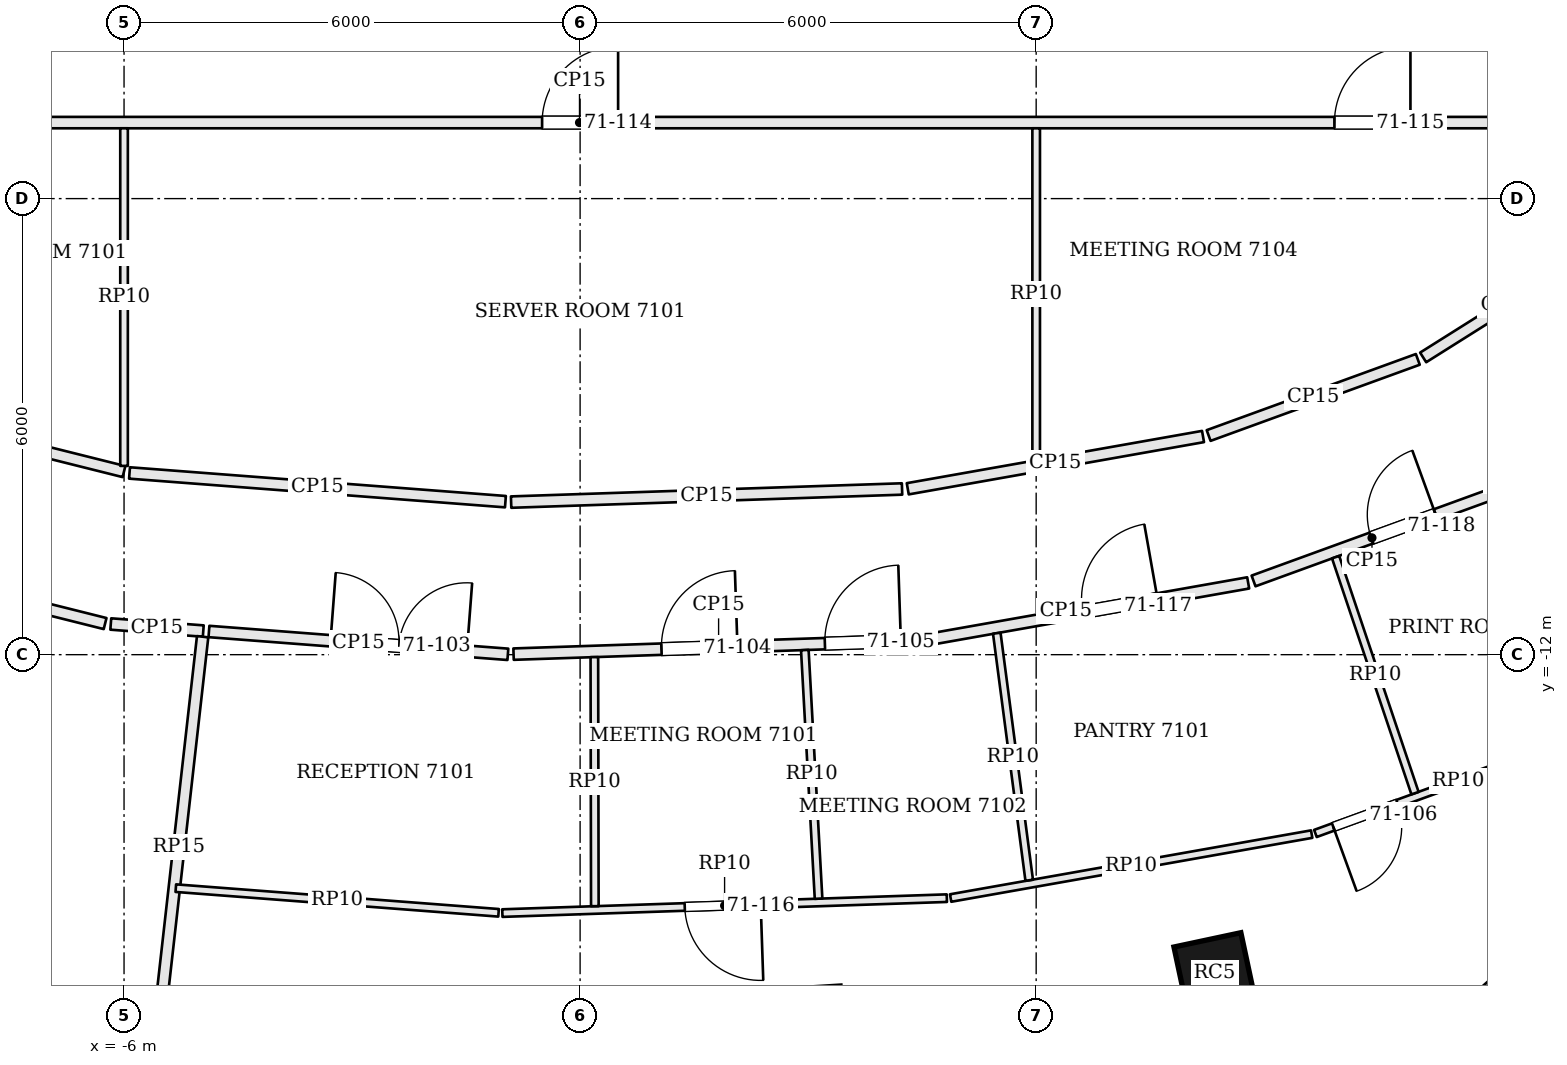
"""IFC4 building model, lengths in metres.
Left out: names, types, materials, properties, quantities, classifications, styles, units other than length and angle.
Written with IfcOpenShell. Run it as: python <this file> out.ifc"""

import sys

from ifc_helpers import new_model, si_unit, direction, frame, frame_2d, origin, origin_2d, place, context, subcontext, project, spatial, rectangle, extrude, element, fill, save


model = new_model("IFC4")
c1 = context("Model", 3, precision=1e-05, world=origin(), true_north=direction((0.0, 1.0)))
c2 = subcontext(c1, "Body", "Model", "MODEL_VIEW")
j1 = project(units=[si_unit("LENGTHUNIT", "METRE"), si_unit("PLANEANGLEUNIT", "RADIAN")], contexts=[c1])
p1 = place(None, origin())
s1 = spatial("IfcSite", under=j1, at=p1, CompositionType="ELEMENT")
p2 = place(p1, origin())
s2 = spatial("IfcBuilding", under=s1, at=p2, CompositionType="ELEMENT")
p3 = place(p2, frame((0.0, 0.0, 288.3)))
s3 = spatial("IfcBuildingStorey", under=s2, at=p3, CompositionType="ELEMENT", Elevation=288.3)
p4 = place(p3, frame((8.347, -16.192, 0.0), z_axis=(0.0, 0.0, 1.0), x_axis=(0.977944102772, 0.208866780156, 0.0)))
e1 = element("IfcColumn", 1, at=p4, inside=s3, PredefinedType="COLUMN", context=c2, shape_type="SweptSolid", body=[
    extrude(rectangle(XDim=0.9, YDim=0.9, at=origin_2d()), origin(), (0.0, 0.0, 1.0), 3.9),
])
p5 = place(p3, frame((9.21, -19.03, 0.0), z_axis=(0.0, 0.0, 1.0), x_axis=(0.747396648191, 0.664378092861, 0.0)))
e2 = element("IfcWall", 2, at=p5, inside=s3, PredefinedType="SOLIDWALL", context=c2, shape_type="SweptSolid", body=[
    extrude(rectangle(XDim=4.252, YDim=0.45, at=frame_2d((2.126, 0.0))), origin(), (0.0, 0.0, 1.0), 3.7),
])
p6 = place(p5, frame((1.076, 0.0, 0.9)))
e3 = element("IfcOpeningElement", 3, at=p6, cuts=e2, PredefinedType="OPENING", context=c2, shape_type="SweptSolid", body=[
    extrude(rectangle(XDim=2.1, YDim=2.3, at=frame_2d((1.05, 1.15))), frame((0.0, 0.235, 0.0), z_axis=(0.0, -1.0, 0.0), x_axis=(1.0, 0.0, 0.0)), (0.0, 0.0, 1.0), 0.47),
])
p7 = place(p3, frame((-10.333, -10.569, 0.0), z_axis=(0.0, 0.0, 1.0), x_axis=(0.970067398009, -0.242835836151, 0.0)))
e4 = element("IfcWall", 4, at=p7, inside=s3, PredefinedType="PARTITIONING", context=c2, shape_type="SweptSolid", body=[
    extrude(rectangle(XDim=4.209, YDim=0.15, at=frame_2d((2.105, 0.0))), origin(), (0.0, 0.0, 1.0), 3.198),
])
p8 = place(p3, frame((-6.175, -11.596, 0.0), z_axis=(0.0, 0.0, 1.0), x_axis=(0.997106038867, -0.076023333621, 0.0)))
e5 = element("IfcWall", 5, at=p8, inside=s3, PredefinedType="PARTITIONING", context=c2, shape_type="SweptSolid", body=[
    extrude(rectangle(XDim=1.22, YDim=0.15, at=frame_2d((0.61, 0.0))), origin(), (0.0, 0.0, 1.0), 3.198),
])
p9 = place(p3, frame((-5.59, -17.294, 0.0), z_axis=(0.0, 0.0, 1.0), x_axis=(0.112044411854, 0.993703200041, 0.0)))
e6 = element("IfcWall", 6, at=p9, inside=s3, PredefinedType="PARTITIONING", context=c2, shape_type="SweptSolid", body=[
    extrude(rectangle(XDim=5.565, YDim=0.15, at=frame_2d((2.783, 0.0))), origin(), (0.0, 0.0, 1.0), 3.234),
])
p10 = place(p3, frame((-4.883, -11.695, 0.0), z_axis=(0.0, 0.0, 1.0), x_axis=(0.997096936577, -0.076142623207, 0.0)))
e7 = element("IfcWall", 7, at=p10, inside=s3, PredefinedType="PARTITIONING", context=c2, shape_type="SweptSolid", body=[
    extrude(rectangle(XDim=3.944, YDim=0.15, at=frame_2d((1.972, 0.0))), origin(), (0.0, 0.0, 1.0), 3.198),
])
p11 = place(p10, frame((1.604, 0.0, 0.0)))
e8 = element("IfcOpeningElement", 8, at=p11, cuts=e7, PredefinedType="OPENING", context=c2, shape_type="SweptSolid", body=[
    extrude(rectangle(XDim=1.8, YDim=2.1, at=frame_2d((0.9, 1.05))), frame((0.0, 0.085, 0.0), z_axis=(0.0, -1.0, 0.0), x_axis=(1.0, 0.0, 0.0)), (0.0, 0.0, 1.0), 0.17),
])
p12 = place(p3, frame((-0.875, -11.993, 0.0), z_axis=(0.0, 0.0, 1.0), x_axis=(0.999436745295, 0.033558786542, 0.0)))
e9 = element("IfcWall", 9, at=p12, inside=s3, PredefinedType="PARTITIONING", context=c2, shape_type="SweptSolid", body=[
    extrude(rectangle(XDim=5.398, YDim=0.15, at=frame_2d((2.699, 0.0))), origin(), (0.0, 0.0, 1.0), 3.198),
])
p13 = place(p12, frame((1.947, 0.0, 0.0)))
e10 = element("IfcOpeningElement", 10, at=p13, cuts=e9, PredefinedType="OPENING", context=c2, shape_type="SweptSolid", body=[
    extrude(rectangle(XDim=1.0, YDim=2.4, at=frame_2d((0.5, 1.2))), frame((0.0, 0.085, 0.0), z_axis=(0.0, -1.0, 0.0), x_axis=(1.0, 0.0, 0.0)), (0.0, 0.0, 1.0), 0.17),
])
p14 = place(p12, frame((4.098, 0.0, 0.0)))
e11 = element("IfcOpeningElement", 11, at=p14, cuts=e9, PredefinedType="OPENING", context=c2, shape_type="SweptSolid", body=[
    extrude(rectangle(XDim=1.0, YDim=2.4, at=frame_2d((0.5, 1.2))), frame((0.0, 0.085, 0.0), z_axis=(0.0, -1.0, 0.0), x_axis=(1.0, 0.0, 0.0)), (0.0, 0.0, 1.0), 0.17),
])
p15 = place(p3, frame((4.594, -11.799, 0.0), z_axis=(0.0, 0.0, 1.0), x_axis=(0.984693444773, 0.174295208833, 0.0)))
e12 = element("IfcWall", 12, at=p15, inside=s3, PredefinedType="PARTITIONING", context=c2, shape_type="SweptSolid", body=[
    extrude(rectangle(XDim=4.261, YDim=0.15, at=frame_2d((2.13, 0.0))), origin(), (0.0, 0.0, 1.0), 3.198),
])
p16 = place(p15, frame((2.05, 0.0, 0.0)))
e13 = element("IfcOpeningElement", 13, at=p16, cuts=e12, PredefinedType="OPENING", context=c2, shape_type="SweptSolid", body=[
    extrude(rectangle(XDim=1.0, YDim=2.1, at=frame_2d((0.5, 1.05))), frame((0.0, 0.085, 0.0), z_axis=(0.0, -1.0, 0.0), x_axis=(1.0, 0.0, 0.0)), (0.0, 0.0, 1.0), 0.17),
])
p17 = place(p3, frame((8.86, -11.03, 0.0), z_axis=(0.0, 0.0, 1.0), x_axis=(0.939685902536, 0.342038601001, 0.0)))
e14 = element("IfcWall", 14, at=p17, inside=s3, PredefinedType="PARTITIONING", context=c2, shape_type="SweptSolid", body=[
    extrude(rectangle(XDim=3.316, YDim=0.15, at=frame_2d((1.658, 0.0))), origin(), (0.0, 0.0, 1.0), 3.198),
])
p18 = place(p17, frame((1.65, 0.0, 0.0)))
e15 = element("IfcOpeningElement", 15, at=p18, cuts=e14, PredefinedType="OPENING", context=c2, shape_type="SweptSolid", body=[
    extrude(rectangle(XDim=0.9, YDim=2.1, at=frame_2d((0.45, 1.05))), frame((0.0, 0.085, 0.0), z_axis=(0.0, -1.0, 0.0), x_axis=(1.0, 0.0, 0.0)), (0.0, 0.0, 1.0), 0.17),
])
p19 = place(p3, frame((13.293, -6.704, 0.0), z_axis=(0.0, 0.0, 1.0), x_axis=(-0.84641299998, -0.532527026041, 0.0)))
e16 = element("IfcWall", 16, at=p19, inside=s3, PredefinedType="PARTITIONING", context=c2, shape_type="SweptSolid", body=[
    extrude(rectangle(XDim=2.602, YDim=0.15, at=frame_2d((1.301, 0.0))), origin(), (0.0, 0.0, 1.0), 3.198),
])
p20 = place(p3, frame((11.021, -8.115, 0.0), z_axis=(0.0, 0.0, 1.0), x_axis=(-0.939683845313, -0.342044252778, 0.0)))
e17 = element("IfcWall", 17, at=p20, inside=s3, PredefinedType="PARTITIONING", context=c2, shape_type="SweptSolid", body=[
    extrude(rectangle(XDim=2.929, YDim=0.15, at=frame_2d((1.464, 0.0))), origin(), (0.0, 0.0, 1.0), 3.198),
])
p21 = place(p3, frame((8.195, -9.13, 0.0), z_axis=(0.0, 0.0, 1.0), x_axis=(-0.9846880937, -0.174325437403, 0.0)))
e18 = element("IfcWall", 18, at=p21, inside=s3, PredefinedType="PARTITIONING", context=c2, shape_type="SweptSolid", body=[
    extrude(rectangle(XDim=3.945, YDim=0.15, at=frame_2d((1.973, 0.0))), origin(), (0.0, 0.0, 1.0), 3.198),
])
p22 = place(p3, frame((4.236, -9.82, 0.0), z_axis=(0.0, 0.0, 1.0), x_axis=(-0.999435760561, -0.033588100749, 0.0)))
e19 = element("IfcWall", 19, at=p22, inside=s3, PredefinedType="PARTITIONING", context=c2, shape_type="SweptSolid", body=[
    extrude(rectangle(XDim=5.146, YDim=0.15, at=frame_2d((2.573, 0.0))), origin(), (0.0, 0.0, 1.0), 3.198),
])
p23 = place(p3, frame((-0.982, -9.987, 0.0), z_axis=(0.0, 0.0, 1.0), x_axis=(-0.997096607341, 0.07614693447, 0.0)))
e20 = element("IfcWall", 20, at=p23, inside=s3, PredefinedType="PARTITIONING", context=c2, shape_type="SweptSolid", body=[
    extrude(rectangle(XDim=4.96, YDim=0.15, at=frame_2d((2.48, 0.0))), origin(), (0.0, 0.0, 1.0), 3.198),
])
p24 = place(p3, frame((-6.001, -9.591, 0.0), z_axis=(0.0, 0.0, 1.0), x_axis=(-0.970063855769, 0.242849986061, 0.0)))
e21 = element("IfcWall", 21, at=p24, inside=s3, PredefinedType="PARTITIONING", context=c2, shape_type="SweptSolid", body=[
    extrude(rectangle(XDim=3.837, YDim=0.15, at=frame_2d((1.919, 0.0))), origin(), (0.0, 0.0, 1.0), 3.198),
])
p25 = place(p3, frame((-14.789, -5.0, 0.0), z_axis=(0.0, 0.0, 1.0), x_axis=(1.0, 0.0, 0.0)))
e22 = element("IfcWall", 22, at=p25, inside=s3, PredefinedType="PARTITIONING", context=c2, shape_type="SweptSolid", body=[
    extrude(rectangle(XDim=29.562, YDim=0.15, at=frame_2d((14.781, 0.0))), origin(), (0.0, 0.0, 1.0), 3.198),
])
p26 = place(p25, frame((3.857, 0.0, 0.0)))
e23 = element("IfcOpeningElement", 23, at=p26, cuts=e22, PredefinedType="OPENING", context=c2, shape_type="SweptSolid", body=[
    extrude(rectangle(XDim=1.0, YDim=2.4, at=frame_2d((0.5, 1.2))), frame((0.0, 0.085, 0.0), z_axis=(0.0, -1.0, 0.0), x_axis=(1.0, 0.0, 0.0)), (0.0, 0.0, 1.0), 0.17),
])
p27 = place(p25, frame((14.289, 0.0, 0.0)))
e24 = element("IfcOpeningElement", 24, at=p27, cuts=e22, PredefinedType="OPENING", context=c2, shape_type="SweptSolid", body=[
    extrude(rectangle(XDim=1.0, YDim=2.1, at=frame_2d((0.5, 1.05))), frame((0.0, 0.085, 0.0), z_axis=(0.0, -1.0, 0.0), x_axis=(1.0, 0.0, 0.0)), (0.0, 0.0, 1.0), 0.17),
])
p28 = place(p25, frame((24.713, 0.0, 0.0)))
e25 = element("IfcOpeningElement", 25, at=p28, cuts=e22, PredefinedType="OPENING", context=c2, shape_type="SweptSolid", body=[
    extrude(rectangle(XDim=1.0, YDim=2.4, at=frame_2d((0.5, 1.2))), frame((0.0, 0.085, 0.0), z_axis=(0.0, -1.0, 0.0), x_axis=(1.0, 0.0, 0.0)), (0.0, 0.0, 1.0), 0.17),
])
p29 = place(p3, frame((13.433, -12.984, 0.0), z_axis=(0.0, 0.0, 1.0), x_axis=(-0.939673979614, -0.342071355182, 0.0)))
e26 = element("IfcWall", 26, at=p29, inside=s3, PredefinedType="PARTITIONING", context=c2, shape_type="SweptSolid", body=[
    extrude(rectangle(XDim=4.0, YDim=0.1, at=frame_2d((2.0, 0.0))), origin(), (0.0, 0.0, 1.0), 3.198),
])
p30 = place(p29, frame((2.85, 0.0, 0.0)))
e27 = element("IfcOpeningElement", 27, at=p30, cuts=e26, PredefinedType="OPENING", context=c2, shape_type="SweptSolid", body=[
    extrude(rectangle(XDim=0.9, YDim=2.1, at=frame_2d((0.45, 1.05))), frame((0.0, 0.06, 0.0), z_axis=(0.0, -1.0, 0.0), x_axis=(1.0, 0.0, 0.0)), (0.0, 0.0, 1.0), 0.12),
])
p31 = place(p3, frame((9.625, -14.361, 0.0), z_axis=(0.0, 0.0, 1.0), x_axis=(-0.984691710098, -0.174305008716, 0.0)))
e28 = element("IfcWall", 28, at=p31, inside=s3, PredefinedType="PARTITIONING", context=c2, shape_type="SweptSolid", body=[
    extrude(rectangle(XDim=4.824, YDim=0.1, at=frame_2d((2.412, 0.0))), origin(), (0.0, 0.0, 1.0), 3.198),
])
p32 = place(p3, frame((4.825, -15.203, 0.0), z_axis=(0.0, 0.0, 1.0), x_axis=(-0.999435699456, -0.033589918924, 0.0)))
e29 = element("IfcWall", 29, at=p32, inside=s3, PredefinedType="PARTITIONING", context=c2, shape_type="SweptSolid", body=[
    extrude(rectangle(XDim=5.851, YDim=0.1, at=frame_2d((2.926, 0.0))), origin(), (0.0, 0.0, 1.0), 3.198),
])
p33 = place(p32, frame((2.45, 0.0, 0.0)))
e30 = element("IfcOpeningElement", 30, at=p33, cuts=e29, PredefinedType="OPENING", context=c2, shape_type="SweptSolid", body=[
    extrude(rectangle(XDim=1.0, YDim=2.4, at=frame_2d((0.5, 1.2))), frame((0.0, 0.06, 0.0), z_axis=(0.0, -1.0, 0.0), x_axis=(1.0, 0.0, 0.0)), (0.0, 0.0, 1.0), 0.12),
])
p34 = place(p3, frame((-1.073, -15.396, 0.0), z_axis=(0.0, 0.0, 1.0), x_axis=(-0.997093140471, 0.076192317369, 0.0)))
e31 = element("IfcWall", 31, at=p34, inside=s3, PredefinedType="PARTITIONING", context=c2, shape_type="SweptSolid", body=[
    extrude(rectangle(XDim=4.259, YDim=0.1, at=frame_2d((2.129, 0.0))), origin(), (0.0, 0.0, 1.0), 3.198),
])
p35 = place(p3, frame((0.188, -12.032, 0.0), z_axis=(0.0, 0.0, 1.0), x_axis=(0.001937258864, -0.999998123512, 0.0)))
e32 = element("IfcWall", 32, at=p35, inside=s3, PredefinedType="PARTITIONING", context=c2, shape_type="SweptSolid", body=[
    extrude(rectangle(XDim=3.277, YDim=0.1, at=frame_2d((1.638, 0.0))), origin(), (0.0, 0.0, 1.0), 3.198),
])
p36 = place(p3, frame((2.956, -11.939, 0.0), z_axis=(0.0, 0.0, 1.0), x_axis=(0.055226477976, -0.998473853504, 0.0)))
e33 = element("IfcWall", 33, at=p36, inside=s3, PredefinedType="PARTITIONING", context=c2, shape_type="SweptSolid", body=[
    extrude(rectangle(XDim=3.276, YDim=0.1, at=frame_2d((1.638, 0.0))), origin(), (0.0, 0.0, 1.0), 3.198),
])
p37 = place(p3, frame((5.482, -11.718, 0.0), z_axis=(0.0, 0.0, 1.0), x_axis=(0.130173255727, -0.991491262439, 0.0)))
e34 = element("IfcWall", 34, at=p37, inside=s3, PredefinedType="PARTITIONING", context=c2, shape_type="SweptSolid", body=[
    extrude(rectangle(XDim=3.278, YDim=0.1, at=frame_2d((1.639, 0.0))), origin(), (0.0, 0.0, 1.0), 3.198),
])
p38 = place(p3, frame((9.94, -10.717, 0.0), z_axis=(0.0, 0.0, 1.0), x_axis=(0.318730603816, -0.947845347191, 0.0)))
e35 = element("IfcWall", 35, at=p38, inside=s3, PredefinedType="PARTITIONING", context=c2, shape_type="SweptSolid", body=[
    extrude(rectangle(XDim=3.276, YDim=0.1, at=frame_2d((1.638, 0.0))), origin(), (0.0, 0.0, 1.0), 3.198),
])
p39 = place(p3, frame((-6.0, -9.516, 0.0), z_axis=(0.0, 0.0, 1.0), x_axis=(0.0, 1.0, 0.0)))
e36 = element("IfcWall", 36, at=p39, inside=s3, PredefinedType="PARTITIONING", context=c2, shape_type="SweptSolid", body=[
    extrude(rectangle(XDim=4.441, YDim=0.1, at=frame_2d((2.221, 0.0))), origin(), (0.0, 0.0, 1.0), 3.198),
])
p40 = place(p3, frame((6.0, -9.444, 0.0), z_axis=(0.0, 0.0, 1.0), x_axis=(0.0, 1.0, 0.0)))
e37 = element("IfcWall", 37, at=p40, inside=s3, PredefinedType="PARTITIONING", context=c2, shape_type="SweptSolid", body=[
    extrude(rectangle(XDim=4.369, YDim=0.1, at=frame_2d((2.184, 0.0))), origin(), (0.0, 0.0, 1.0), 3.198),
])
p41 = place(p11, origin())
e38 = element("IfcDoor", 38, at=p41, inside=s3, OperationType="DOUBLE_DOOR_SINGLE_SWING", PredefinedType="DOOR", context=c2, shape_type="SweptSolid", body=[
    extrude(rectangle(XDim=1.8, YDim=2.1, at=frame_2d((0.9, 1.05))), frame((0.0, 0.025, 0.0), z_axis=(0.0, -1.0, 0.0), x_axis=(1.0, 0.0, 0.0)), (0.0, 0.0, 1.0), 0.05),
])
fill(e8, e38)
p42 = place(p13, origin())
e39 = element("IfcDoor", 39, at=p42, inside=s3, OperationType="SINGLE_SWING_RIGHT", PredefinedType="DOOR", context=c2, shape_type="SweptSolid", body=[
    extrude(rectangle(XDim=1.0, YDim=2.4, at=frame_2d((0.5, 1.2))), frame((0.0, 0.025, 0.0), z_axis=(0.0, -1.0, 0.0), x_axis=(1.0, 0.0, 0.0)), (0.0, 0.0, 1.0), 0.05),
])
fill(e10, e39)
p43 = place(p14, origin())
e40 = element("IfcDoor", 40, at=p43, inside=s3, OperationType="SINGLE_SWING_RIGHT", PredefinedType="DOOR", context=c2, shape_type="SweptSolid", body=[
    extrude(rectangle(XDim=1.0, YDim=2.4, at=frame_2d((0.5, 1.2))), frame((0.0, 0.025, 0.0), z_axis=(0.0, -1.0, 0.0), x_axis=(1.0, 0.0, 0.0)), (0.0, 0.0, 1.0), 0.05),
])
fill(e11, e40)
p44 = place(p30, origin())
e41 = element("IfcDoor", 41, at=p44, inside=s3, OperationType="SINGLE_SWING_RIGHT", PredefinedType="DOOR", context=c2, shape_type="SweptSolid", body=[
    extrude(rectangle(XDim=0.9, YDim=2.1, at=frame_2d((0.45, 1.05))), frame((0.0, 0.025, 0.0), z_axis=(0.0, -1.0, 0.0), x_axis=(1.0, 0.0, 0.0)), (0.0, 0.0, 1.0), 0.05),
])
fill(e27, e41)
p45 = place(p27, origin())
e42 = element("IfcDoor", 42, at=p45, inside=s3, OperationType="SINGLE_SWING_RIGHT", PredefinedType="DOOR", context=c2, shape_type="SweptSolid", body=[
    extrude(rectangle(XDim=1.0, YDim=2.1, at=frame_2d((0.5, 1.05))), frame((0.0, 0.025, 0.0), z_axis=(0.0, -1.0, 0.0), x_axis=(1.0, 0.0, 0.0)), (0.0, 0.0, 1.0), 0.05),
])
fill(e24, e42)
p46 = place(p28, origin())
e43 = element("IfcDoor", 43, at=p46, inside=s3, OperationType="SINGLE_SWING_RIGHT", PredefinedType="DOOR", context=c2, shape_type="SweptSolid", body=[
    extrude(rectangle(XDim=1.0, YDim=2.4, at=frame_2d((0.5, 1.2))), frame((0.0, 0.025, 0.0), z_axis=(0.0, -1.0, 0.0), x_axis=(1.0, 0.0, 0.0)), (0.0, 0.0, 1.0), 0.05),
])
fill(e25, e43)
p47 = place(p33, origin())
e44 = element("IfcDoor", 44, at=p47, inside=s3, OperationType="SINGLE_SWING_LEFT", PredefinedType="DOOR", context=c2, shape_type="SweptSolid", body=[
    extrude(rectangle(XDim=1.0, YDim=2.4, at=frame_2d((0.5, 1.2))), frame((0.0, 0.025, 0.0), z_axis=(0.0, -1.0, 0.0), x_axis=(1.0, 0.0, 0.0)), (0.0, 0.0, 1.0), 0.05),
])
fill(e30, e44)
p48 = place(p16, origin())
e45 = element("IfcDoor", 45, at=p48, inside=s3, OperationType="SINGLE_SWING_RIGHT", PredefinedType="DOOR", context=c2, shape_type="SweptSolid", body=[
    extrude(rectangle(XDim=1.0, YDim=2.1, at=frame_2d((0.5, 1.05))), frame((0.0, 0.025, 0.0), z_axis=(0.0, -1.0, 0.0), x_axis=(1.0, 0.0, 0.0)), (0.0, 0.0, 1.0), 0.05),
])
fill(e13, e45)
p49 = place(p18, origin())
e46 = element("IfcDoor", 46, at=p49, inside=s3, OperationType="SINGLE_SWING_RIGHT", PredefinedType="DOOR", context=c2, shape_type="SweptSolid", body=[
    extrude(rectangle(XDim=0.9, YDim=2.1, at=frame_2d((0.45, 1.05))), frame((0.0, 0.025, 0.0), z_axis=(0.0, -1.0, 0.0), x_axis=(1.0, 0.0, 0.0)), (0.0, 0.0, 1.0), 0.05),
])
fill(e15, e46)
save(model, sys.argv[1])
